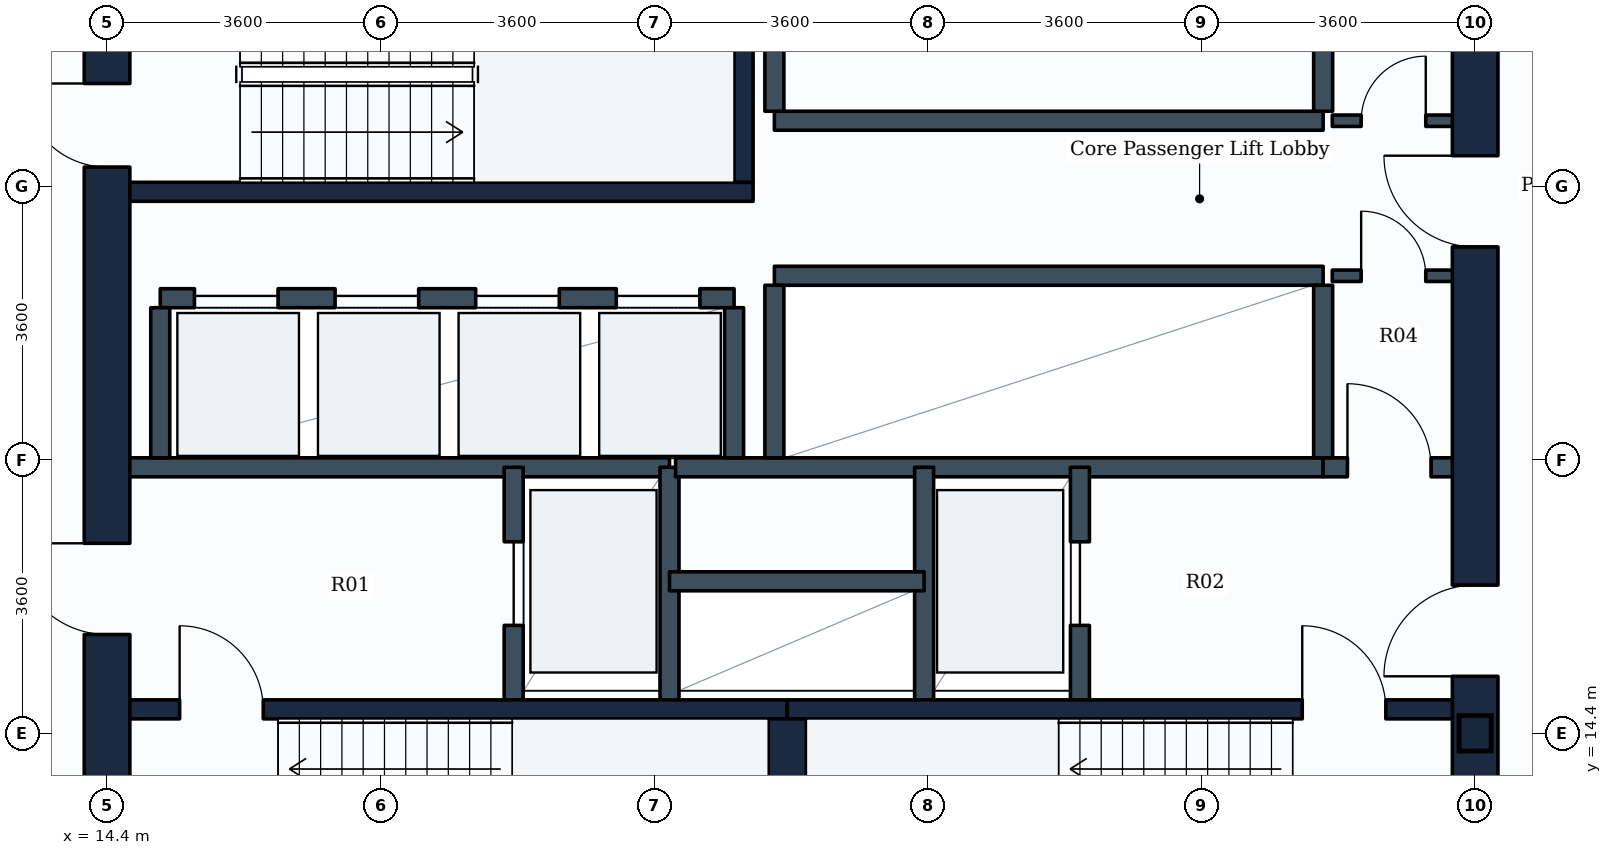
"""IFC4 building model, lengths in metres.
Left out: names, types, materials, properties, quantities, classifications, styles, units other than length and angle.
Written with IfcOpenShell. Run it as: python <this file> out.ifc"""

import sys

from ifc_helpers import new_model, si_unit, direction, frame, frame_2d, origin, origin_2d, place, context, subcontext, project, spatial, rectangle, i_section, extrude, element, fill, save


model = new_model("IFC4")
c1 = context("Model", 3, precision=1e-05, world=origin(), true_north=direction((0.0, 1.0)))
c2 = subcontext(c1, "Body", "Model", "MODEL_VIEW")
j1 = project(units=[si_unit("LENGTHUNIT", "METRE"), si_unit("PLANEANGLEUNIT", "RADIAN")], contexts=[c1])
p1 = place(None, origin())
s1 = spatial("IfcSite", under=j1, at=p1, CompositionType="ELEMENT")
p2 = place(p1, origin())
s2 = spatial("IfcBuilding", under=s1, at=p2, CompositionType="ELEMENT")
p3 = place(p2, frame((0.0, 0.0, 35.7)))
s3 = spatial("IfcBuildingStorey", under=s2, at=p3, CompositionType="ELEMENT", Elevation=35.7)
p4 = place(p3, frame((32.4, 14.4, 0.0), z_axis=(0.0, 0.0, 1.0), x_axis=(1.0, 0.0, 0.0)))
e1 = element("IfcColumn", 1, at=p4, inside=s3, PredefinedType="COLUMN", context=c2, shape_type="SweptSolid", body=[
    extrude(i_section(OverallWidth=0.424, OverallDepth=0.467, WebThickness=0.033, FlangeThickness=0.053, FilletRadius=0.015, at=origin_2d()), origin(), (0.0, 0.0, 1.0), 3.9),
])
p5 = place(p3, frame((14.4, 10.8, 0.0), z_axis=(0.0, 0.0, 1.0), x_axis=(0.0, 1.0, 0.0)))
e2 = element("IfcWall", 2, at=p5, inside=s3, PredefinedType="SHEAR", context=c2, shape_type="SweptSolid", body=[
    extrude(rectangle(XDim=14.4, YDim=0.6, at=frame_2d((7.2, 0.0))), origin(), (0.0, 0.0, 1.0), 3.65),
])
p6 = place(p5, frame((11.05, 0.0, 0.0)))
e3 = element("IfcOpeningElement", 3, at=p6, cuts=e2, PredefinedType="OPENING", context=c2, shape_type="SweptSolid", body=[
    extrude(rectangle(XDim=1.1, YDim=2.1, at=frame_2d((0.55, 1.05))), frame((0.0, 0.31, 0.0), z_axis=(0.0, -1.0, 0.0), x_axis=(1.0, 0.0, 0.0)), (0.0, 0.0, 1.0), 0.62),
])
p7 = place(p5, frame((4.9, 0.0, 0.0)))
e4 = element("IfcOpeningElement", 4, at=p7, cuts=e2, PredefinedType="OPENING", context=c2, shape_type="SweptSolid", body=[
    extrude(rectangle(XDim=1.2, YDim=2.1, at=frame_2d((0.6, 1.05))), frame((0.0, 0.31, 0.0), z_axis=(0.0, -1.0, 0.0), x_axis=(1.0, 0.0, 0.0)), (0.0, 0.0, 1.0), 0.62),
])
p8 = place(p3, frame((32.4, 10.8, 0.0), z_axis=(0.0, 0.0, 1.0), x_axis=(0.0, 1.0, 0.0)))
e5 = element("IfcWall", 5, at=p8, inside=s3, PredefinedType="SHEAR", context=c2, shape_type="SweptSolid", body=[
    extrude(rectangle(XDim=14.4, YDim=0.6, at=frame_2d((7.2, 0.0))), origin(), (0.0, 0.0, 1.0), 3.65),
])
p9 = place(p8, frame((4.35, 0.0, 0.0)))
e6 = element("IfcOpeningElement", 6, at=p9, cuts=e5, PredefinedType="OPENING", context=c2, shape_type="SweptSolid", body=[
    extrude(rectangle(XDim=1.2, YDim=2.1, at=frame_2d((0.6, 1.05))), frame((0.0, 0.31, 0.0), z_axis=(0.0, -1.0, 0.0), x_axis=(1.0, 0.0, 0.0)), (0.0, 0.0, 1.0), 0.62),
])
p10 = place(p8, frame((10.0, 0.0, 0.0)))
e7 = element("IfcOpeningElement", 7, at=p10, cuts=e5, PredefinedType="OPENING", context=c2, shape_type="SweptSolid", body=[
    extrude(rectangle(XDim=1.2, YDim=2.1, at=frame_2d((0.6, 1.05))), frame((0.0, 0.31, 0.0), z_axis=(0.0, -1.0, 0.0), x_axis=(1.0, 0.0, 0.0)), (0.0, 0.0, 1.0), 0.62),
])
p11 = place(p3, frame((14.7, 14.715, 0.0), z_axis=(0.0, 0.0, 1.0), x_axis=(1.0, 0.0, 0.0)))
e8 = element("IfcWall", 8, at=p11, inside=s3, PredefinedType="SHEAR", context=c2, shape_type="SweptSolid", body=[
    extrude(rectangle(XDim=8.65, YDim=0.25, at=frame_2d((4.325, 0.0))), origin(), (0.0, 0.0, 1.0), 3.65),
])
p12 = place(p11, frame((0.655, 0.0, 0.0)))
e9 = element("IfcOpeningElement", 9, at=p12, cuts=e8, PredefinedType="OPENING", context=c2, shape_type="SweptSolid", body=[
    extrude(rectangle(XDim=1.1, YDim=2.1, at=frame_2d((0.55, 1.05))), frame((0.0, 0.135, 0.0), z_axis=(0.0, -1.0, 0.0), x_axis=(1.0, 0.0, 0.0)), (0.0, 0.0, 1.0), 0.27),
])
p13 = place(p3, frame((23.35, 14.715, 0.0), z_axis=(0.0, 0.0, 1.0), x_axis=(1.0, 0.0, 0.0)))
e10 = element("IfcWall", 10, at=p13, inside=s3, PredefinedType="SHEAR", context=c2, shape_type="SweptSolid", body=[
    extrude(rectangle(XDim=8.75, YDim=0.25, at=frame_2d((4.375, 0.0))), origin(), (0.0, 0.0, 1.0), 3.65),
])
p14 = place(p13, frame((6.775, 0.0, 0.0)))
e11 = element("IfcOpeningElement", 11, at=p14, cuts=e10, PredefinedType="OPENING", context=c2, shape_type="SweptSolid", body=[
    extrude(rectangle(XDim=1.1, YDim=2.1, at=frame_2d((0.55, 1.05))), frame((0.0, 0.135, 0.0), z_axis=(0.0, -1.0, 0.0), x_axis=(1.0, 0.0, 0.0)), (0.0, 0.0, 1.0), 0.27),
])
p15 = place(p3, frame((23.35, 11.75, 0.0), z_axis=(0.0, 0.0, 1.0), x_axis=(0.0, 1.0, 0.0)))
e12 = element("IfcWall", 12, at=p15, inside=s3, PredefinedType="SHEAR", context=c2, shape_type="SweptSolid", body=[
    extrude(rectangle(XDim=2.84, YDim=0.5, at=frame_2d((1.42, 0.0))), origin(), (0.0, 0.0, 1.0), 3.65),
])
p16 = place(p3, frame((14.7, 21.525, 0.0), z_axis=(0.0, 0.0, 1.0), x_axis=(1.0, 0.0, 0.0)))
e13 = element("IfcWall", 13, at=p16, inside=s3, PredefinedType="SHEAR", context=c2, shape_type="SweptSolid", body=[
    extrude(rectangle(XDim=8.2, YDim=0.25, at=frame_2d((4.1, 0.0))), origin(), (0.0, 0.0, 1.0), 3.65),
])
p17 = place(p3, frame((22.775, 21.65, 0.0), z_axis=(0.0, 0.0, 1.0), x_axis=(0.0, 1.0, 0.0)))
e14 = element("IfcWall", 14, at=p17, inside=s3, PredefinedType="SHEAR", context=c2, shape_type="SweptSolid", body=[
    extrude(rectangle(XDim=2.84, YDim=0.25, at=frame_2d((1.42, 0.0))), origin(), (0.0, 0.0, 1.0), 3.65),
])
p18 = place(p3, frame((14.65, 17.9, 0.0), z_axis=(0.0, 0.0, 1.0), x_axis=(1.0, 0.0, 0.0)))
e15 = element("IfcWall", 15, at=p18, inside=s3, PredefinedType="PARTITIONING", context=c2, shape_type="SweptSolid", body=[
    extrude(rectangle(XDim=7.15, YDim=0.25, at=frame_2d((3.575, 0.0))), origin(), (0.0, 0.0, 1.0), 3.635),
])
p19 = place(p3, frame((19.75, 14.84, 0.0), z_axis=(0.0, 0.0, 1.0), x_axis=(0.0, 1.0, 0.0)))
e16 = element("IfcWall", 16, at=p19, inside=s3, PredefinedType="PARTITIONING", context=c2, shape_type="SweptSolid", body=[
    extrude(rectangle(XDim=3.06, YDim=0.25, at=frame_2d((1.53, 0.0))), origin(), (0.0, 0.0, 1.0), 3.635),
])
p20 = place(p19, frame((0.98, 0.0, 0.0)))
e17 = element("IfcOpeningElement", 17, at=p20, cuts=e16, PredefinedType="OPENING", context=c2, shape_type="SweptSolid", body=[
    extrude(rectangle(XDim=1.1, YDim=2.1, at=frame_2d((0.55, 1.05))), frame((0.0, 0.135, 0.0), z_axis=(0.0, -1.0, 0.0), x_axis=(1.0, 0.0, 0.0)), (0.0, 0.0, 1.0), 0.27),
])
p21 = place(p3, frame((21.8, 14.84, 0.0), z_axis=(0.0, 0.0, 1.0), x_axis=(0.0, 1.0, 0.0)))
e18 = element("IfcWall", 18, at=p21, inside=s3, PredefinedType="PARTITIONING", context=c2, shape_type="SweptSolid", body=[
    extrude(rectangle(XDim=3.06, YDim=0.25, at=frame_2d((1.53, 0.0))), origin(), (0.0, 0.0, 1.0), 3.635),
])
p22 = place(p3, frame((21.88, 17.9, 0.0), z_axis=(0.0, 0.0, 1.0), x_axis=(1.0, 0.0, 0.0)))
e19 = element("IfcWall", 19, at=p22, inside=s3, PredefinedType="PARTITIONING", context=c2, shape_type="SweptSolid", body=[
    extrude(rectangle(XDim=8.52, YDim=0.25, at=frame_2d((4.26, 0.0))), origin(), (0.0, 0.0, 1.0), 3.635),
])
p23 = place(p3, frame((30.4, 17.9, 0.0), z_axis=(0.0, 0.0, 1.0), x_axis=(1.0, 0.0, 0.0)))
e20 = element("IfcWall", 20, at=p23, inside=s3, PredefinedType="PARTITIONING", context=c2, shape_type="SweptSolid", body=[
    extrude(rectangle(XDim=1.75, YDim=0.25, at=frame_2d((0.875, 0.0))), origin(), (0.0, 0.0, 1.0), 3.635),
])
p24 = place(p23, frame((0.32, 0.0, 0.0)))
e21 = element("IfcOpeningElement", 21, at=p24, cuts=e20, PredefinedType="OPENING", context=c2, shape_type="SweptSolid", body=[
    extrude(rectangle(XDim=1.1, YDim=2.1, at=frame_2d((0.55, 1.05))), frame((0.0, 0.135, 0.0), z_axis=(0.0, -1.0, 0.0), x_axis=(1.0, 0.0, 0.0)), (0.0, 0.0, 1.0), 0.27),
])
p25 = place(p3, frame((25.15, 14.84, 0.0), z_axis=(0.0, 0.0, 1.0), x_axis=(0.0, 1.0, 0.0)))
e22 = element("IfcWall", 22, at=p25, inside=s3, PredefinedType="PARTITIONING", context=c2, shape_type="SweptSolid", body=[
    extrude(rectangle(XDim=3.06, YDim=0.25, at=frame_2d((1.53, 0.0))), origin(), (0.0, 0.0, 1.0), 3.635),
])
p26 = place(p3, frame((27.2, 14.84, 0.0), z_axis=(0.0, 0.0, 1.0), x_axis=(0.0, 1.0, 0.0)))
e23 = element("IfcWall", 23, at=p26, inside=s3, PredefinedType="PARTITIONING", context=c2, shape_type="SweptSolid", body=[
    extrude(rectangle(XDim=3.06, YDim=0.25, at=frame_2d((1.53, 0.0))), origin(), (0.0, 0.0, 1.0), 3.635),
])
p27 = place(p26, frame((0.98, 0.0, 0.0)))
e24 = element("IfcOpeningElement", 24, at=p27, cuts=e23, PredefinedType="OPENING", context=c2, shape_type="SweptSolid", body=[
    extrude(rectangle(XDim=1.1, YDim=2.1, at=frame_2d((0.55, 1.05))), frame((0.0, 0.135, 0.0), z_axis=(0.0, -1.0, 0.0), x_axis=(1.0, 0.0, 0.0)), (0.0, 0.0, 1.0), 0.27),
])
p28 = place(p3, frame((21.8, 16.4, 0.0), z_axis=(0.0, 0.0, 1.0), x_axis=(1.0, 0.0, 0.0)))
e25 = element("IfcWall", 25, at=p28, inside=s3, PredefinedType="PARTITIONING", context=c2, shape_type="SweptSolid", body=[
    extrude(rectangle(XDim=3.35, YDim=0.25, at=frame_2d((1.675, 0.0))), origin(), (0.0, 0.0, 1.0), 3.635),
])
p29 = place(p3, frame((15.1, 20.125, 0.0), z_axis=(0.0, 0.0, 1.0), x_axis=(1.0, 0.0, 0.0)))
e26 = element("IfcWall", 26, at=p29, inside=s3, PredefinedType="PARTITIONING", context=c2, shape_type="SweptSolid", body=[
    extrude(rectangle(XDim=7.55, YDim=0.25, at=frame_2d((3.775, 0.0))), origin(), (0.0, 0.0, 1.0), 3.635),
])
p30 = place(p29, frame((0.45, 0.0, 0.0)))
e27 = element("IfcOpeningElement", 27, at=p30, cuts=e26, PredefinedType="OPENING", context=c2, shape_type="SweptSolid", body=[
    extrude(rectangle(XDim=1.1, YDim=2.1, at=frame_2d((0.55, 1.05))), frame((0.0, 0.135, 0.0), z_axis=(0.0, -1.0, 0.0), x_axis=(1.0, 0.0, 0.0)), (0.0, 0.0, 1.0), 0.27),
])
p31 = place(p29, frame((2.3, 0.0, 0.0)))
e28 = element("IfcOpeningElement", 28, at=p31, cuts=e26, PredefinedType="OPENING", context=c2, shape_type="SweptSolid", body=[
    extrude(rectangle(XDim=1.1, YDim=2.1, at=frame_2d((0.55, 1.05))), frame((0.0, 0.135, 0.0), z_axis=(0.0, -1.0, 0.0), x_axis=(1.0, 0.0, 0.0)), (0.0, 0.0, 1.0), 0.27),
])
p32 = place(p29, frame((4.15, 0.0, 0.0)))
e29 = element("IfcOpeningElement", 29, at=p32, cuts=e26, PredefinedType="OPENING", context=c2, shape_type="SweptSolid", body=[
    extrude(rectangle(XDim=1.1, YDim=2.1, at=frame_2d((0.55, 1.05))), frame((0.0, 0.135, 0.0), z_axis=(0.0, -1.0, 0.0), x_axis=(1.0, 0.0, 0.0)), (0.0, 0.0, 1.0), 0.27),
])
p33 = place(p29, frame((6.0, 0.0, 0.0)))
e30 = element("IfcOpeningElement", 30, at=p33, cuts=e26, PredefinedType="OPENING", context=c2, shape_type="SweptSolid", body=[
    extrude(rectangle(XDim=1.1, YDim=2.1, at=frame_2d((0.55, 1.05))), frame((0.0, 0.135, 0.0), z_axis=(0.0, -1.0, 0.0), x_axis=(1.0, 0.0, 0.0)), (0.0, 0.0, 1.0), 0.27),
])
for number, where, z_axis, x_axis in (
    (31, (15.1, 18.025, 0.0), (0.0, 0.0, 1.0), (0.0, 1.0, 0.0)),
    (32, (22.65, 18.025, 0.0), (0.0, 0.0, 1.0), (0.0, 1.0, 0.0)),
):
    element("IfcWall", number, at=place(p3, frame(where, z_axis=z_axis, x_axis=x_axis)), inside=s3, PredefinedType="PARTITIONING", context=c2, shape_type="SweptSolid", body=[
        extrude(rectangle(XDim=1.975, YDim=0.25, at=frame_2d((0.988, 0.0))), origin(), (0.0, 0.0, 1.0), 3.635),
    ])
p34 = place(p3, frame((23.18, 20.42, 0.0), z_axis=(0.0, 0.0, 1.0), x_axis=(1.0, 0.0, 0.0)))
e33 = element("IfcWall", 33, at=p34, inside=s3, PredefinedType="PARTITIONING", context=c2, shape_type="SweptSolid", body=[
    extrude(rectangle(XDim=7.22, YDim=0.25, at=frame_2d((3.61, 0.0))), origin(), (0.0, 0.0, 1.0), 3.635),
])
for number, where, z_axis, x_axis in (
    (34, (23.18, 18.025, 0.0), (0.0, 0.0, 1.0), (0.0, 1.0, 0.0)),
    (35, (30.4, 18.025, 0.0), (0.0, 0.0, 1.0), (0.0, 1.0, 0.0)),
):
    element("IfcWall", number, at=place(p3, frame(where, z_axis=z_axis, x_axis=x_axis)), inside=s3, PredefinedType="PARTITIONING", context=c2, shape_type="SweptSolid", body=[
        extrude(rectangle(XDim=2.27, YDim=0.25, at=frame_2d((1.135, 0.0))), origin(), (0.0, 0.0, 1.0), 3.635),
    ])
p35 = place(p3, frame((23.18, 22.46, 0.0), z_axis=(0.0, 0.0, 1.0), x_axis=(1.0, 0.0, 0.0)))
e36 = element("IfcWall", 36, at=p35, inside=s3, PredefinedType="PARTITIONING", context=c2, shape_type="SweptSolid", body=[
    extrude(rectangle(XDim=7.22, YDim=0.25, at=frame_2d((3.61, 0.0))), origin(), (0.0, 0.0, 1.0), 3.635),
])
for number, where, z_axis, x_axis in (
    (37, (23.18, 22.585, 0.0), (0.0, 0.0, 1.0), (0.0, 1.0, 0.0)),
    (38, (30.4, 22.585, 0.0), (0.0, 0.0, 1.0), (0.0, 1.0, 0.0)),
):
    element("IfcWall", number, at=place(p3, frame(where, z_axis=z_axis, x_axis=x_axis)), inside=s3, PredefinedType="PARTITIONING", context=c2, shape_type="SweptSolid", body=[
        extrude(rectangle(XDim=2.315, YDim=0.25, at=frame_2d((1.157, 0.0))), origin(), (0.0, 0.0, 1.0), 3.635),
    ])
p36 = place(p3, frame((30.52, 22.46, 0.0), z_axis=(0.0, 0.0, 1.0), x_axis=(1.0, 0.0, 0.0)))
e39 = element("IfcWall", 39, at=p36, inside=s3, PredefinedType="PARTITIONING", context=c2, shape_type="SweptSolid", body=[
    extrude(rectangle(XDim=1.63, YDim=0.15, at=frame_2d((0.815, 0.0))), origin(), (0.0, 0.0, 1.0), 3.635),
])
p37 = place(p36, frame((0.38, 0.0, 0.0)))
e40 = element("IfcOpeningElement", 40, at=p37, cuts=e39, PredefinedType="OPENING", context=c2, shape_type="SweptSolid", body=[
    extrude(rectangle(XDim=0.85, YDim=2.1, at=frame_2d((0.425, 1.05))), frame((0.0, 0.085, 0.0), z_axis=(0.0, -1.0, 0.0), x_axis=(1.0, 0.0, 0.0)), (0.0, 0.0, 1.0), 0.17),
])
p38 = place(p3, frame((30.52, 20.42, 0.0), z_axis=(0.0, 0.0, 1.0), x_axis=(1.0, 0.0, 0.0)))
e41 = element("IfcWall", 41, at=p38, inside=s3, PredefinedType="PARTITIONING", context=c2, shape_type="SweptSolid", body=[
    extrude(rectangle(XDim=1.63, YDim=0.15, at=frame_2d((0.815, 0.0))), origin(), (0.0, 0.0, 1.0), 3.635),
])
p39 = place(p38, frame((0.38, 0.0, 0.0)))
e42 = element("IfcOpeningElement", 42, at=p39, cuts=e41, PredefinedType="OPENING", context=c2, shape_type="SweptSolid", body=[
    extrude(rectangle(XDim=0.85, YDim=2.1, at=frame_2d((0.425, 1.05))), frame((0.0, 0.085, 0.0), z_axis=(0.0, -1.0, 0.0), x_axis=(1.0, 0.0, 0.0)), (0.0, 0.0, 1.0), 0.17),
])
p40 = place(p12, origin())
e43 = element("IfcDoor", 43, at=p40, inside=s3, OperationType="SINGLE_SWING_LEFT", PredefinedType="DOOR", context=c2, shape_type="SweptSolid", body=[
    extrude(rectangle(XDim=1.1, YDim=2.1, at=frame_2d((0.55, 1.05))), frame((0.0, 0.025, 0.0), z_axis=(0.0, -1.0, 0.0), x_axis=(1.0, 0.0, 0.0)), (0.0, 0.0, 1.0), 0.05),
])
fill(e9, e43)
p41 = place(p14, origin())
e44 = element("IfcDoor", 44, at=p41, inside=s3, OperationType="SINGLE_SWING_LEFT", PredefinedType="DOOR", context=c2, shape_type="SweptSolid", body=[
    extrude(rectangle(XDim=1.1, YDim=2.1, at=frame_2d((0.55, 1.05))), frame((0.0, 0.025, 0.0), z_axis=(0.0, -1.0, 0.0), x_axis=(1.0, 0.0, 0.0)), (0.0, 0.0, 1.0), 0.05),
])
fill(e11, e44)
p42 = place(p6, origin())
e45 = element("IfcDoor", 45, at=p42, inside=s3, OperationType="SINGLE_SWING_RIGHT", PredefinedType="DOOR", context=c2, shape_type="SweptSolid", body=[
    extrude(rectangle(XDim=1.1, YDim=2.1, at=frame_2d((0.55, 1.05))), frame((0.0, 0.025, 0.0), z_axis=(0.0, -1.0, 0.0), x_axis=(1.0, 0.0, 0.0)), (0.0, 0.0, 1.0), 0.05),
])
fill(e3, e45)
p43 = place(p20, origin())
e46 = element("IfcDoor", 46, at=p43, inside=s3, OperationType="SLIDING_TO_LEFT", PredefinedType="DOOR", context=c2, shape_type="SweptSolid", body=[
    extrude(rectangle(XDim=1.1, YDim=2.1, at=frame_2d((0.55, 1.05))), frame((0.0, 0.025, 0.0), z_axis=(0.0, -1.0, 0.0), x_axis=(1.0, 0.0, 0.0)), (0.0, 0.0, 1.0), 0.05),
])
fill(e17, e46)
p44 = place(p27, origin())
e47 = element("IfcDoor", 47, at=p44, inside=s3, OperationType="SLIDING_TO_LEFT", PredefinedType="DOOR", context=c2, shape_type="SweptSolid", body=[
    extrude(rectangle(XDim=1.1, YDim=2.1, at=frame_2d((0.55, 1.05))), frame((0.0, 0.025, 0.0), z_axis=(0.0, -1.0, 0.0), x_axis=(1.0, 0.0, 0.0)), (0.0, 0.0, 1.0), 0.05),
])
fill(e24, e47)
p45 = place(p7, origin())
e48 = element("IfcDoor", 48, at=p45, inside=s3, OperationType="SINGLE_SWING_RIGHT", PredefinedType="DOOR", context=c2, shape_type="SweptSolid", body=[
    extrude(rectangle(XDim=1.2, YDim=2.1, at=frame_2d((0.6, 1.05))), frame((0.0, 0.025, 0.0), z_axis=(0.0, -1.0, 0.0), x_axis=(1.0, 0.0, 0.0)), (0.0, 0.0, 1.0), 0.05),
])
fill(e4, e48)
p46 = place(p9, origin())
e49 = element("IfcDoor", 49, at=p46, inside=s3, OperationType="SINGLE_SWING_LEFT", PredefinedType="DOOR", context=c2, shape_type="SweptSolid", body=[
    extrude(rectangle(XDim=1.2, YDim=2.1, at=frame_2d((0.6, 1.05))), frame((0.0, 0.025, 0.0), z_axis=(0.0, -1.0, 0.0), x_axis=(1.0, 0.0, 0.0)), (0.0, 0.0, 1.0), 0.05),
])
fill(e6, e49)
p47 = place(p24, origin())
e50 = element("IfcDoor", 50, at=p47, inside=s3, OperationType="SINGLE_SWING_LEFT", PredefinedType="DOOR", context=c2, shape_type="SweptSolid", body=[
    extrude(rectangle(XDim=1.1, YDim=2.1, at=frame_2d((0.55, 1.05))), frame((0.0, 0.025, 0.0), z_axis=(0.0, -1.0, 0.0), x_axis=(1.0, 0.0, 0.0)), (0.0, 0.0, 1.0), 0.05),
])
fill(e21, e50)
p48 = place(p30, origin())
e51 = element("IfcDoor", 51, at=p48, inside=s3, OperationType="SLIDING_TO_LEFT", PredefinedType="DOOR", context=c2, shape_type="SweptSolid", body=[
    extrude(rectangle(XDim=1.1, YDim=2.1, at=frame_2d((0.55, 1.05))), frame((0.0, 0.025, 0.0), z_axis=(0.0, -1.0, 0.0), x_axis=(1.0, 0.0, 0.0)), (0.0, 0.0, 1.0), 0.05),
])
fill(e27, e51)
p49 = place(p31, origin())
e52 = element("IfcDoor", 52, at=p49, inside=s3, OperationType="SLIDING_TO_LEFT", PredefinedType="DOOR", context=c2, shape_type="SweptSolid", body=[
    extrude(rectangle(XDim=1.1, YDim=2.1, at=frame_2d((0.55, 1.05))), frame((0.0, 0.025, 0.0), z_axis=(0.0, -1.0, 0.0), x_axis=(1.0, 0.0, 0.0)), (0.0, 0.0, 1.0), 0.05),
])
fill(e28, e52)
p50 = place(p32, origin())
e53 = element("IfcDoor", 53, at=p50, inside=s3, OperationType="SLIDING_TO_LEFT", PredefinedType="DOOR", context=c2, shape_type="SweptSolid", body=[
    extrude(rectangle(XDim=1.1, YDim=2.1, at=frame_2d((0.55, 1.05))), frame((0.0, 0.025, 0.0), z_axis=(0.0, -1.0, 0.0), x_axis=(1.0, 0.0, 0.0)), (0.0, 0.0, 1.0), 0.05),
])
fill(e29, e53)
p51 = place(p33, origin())
e54 = element("IfcDoor", 54, at=p51, inside=s3, OperationType="SLIDING_TO_LEFT", PredefinedType="DOOR", context=c2, shape_type="SweptSolid", body=[
    extrude(rectangle(XDim=1.1, YDim=2.1, at=frame_2d((0.55, 1.05))), frame((0.0, 0.025, 0.0), z_axis=(0.0, -1.0, 0.0), x_axis=(1.0, 0.0, 0.0)), (0.0, 0.0, 1.0), 0.05),
])
fill(e30, e54)
p52 = place(p10, origin())
e55 = element("IfcDoor", 55, at=p52, inside=s3, OperationType="SINGLE_SWING_RIGHT", PredefinedType="DOOR", context=c2, shape_type="SweptSolid", body=[
    extrude(rectangle(XDim=1.2, YDim=2.1, at=frame_2d((0.6, 1.05))), frame((0.0, 0.025, 0.0), z_axis=(0.0, -1.0, 0.0), x_axis=(1.0, 0.0, 0.0)), (0.0, 0.0, 1.0), 0.05),
])
fill(e7, e55)
p53 = place(p37, origin())
e56 = element("IfcDoor", 56, at=p53, inside=s3, OperationType="SINGLE_SWING_RIGHT", PredefinedType="DOOR", context=c2, shape_type="SweptSolid", body=[
    extrude(rectangle(XDim=0.85, YDim=2.1, at=frame_2d((0.425, 1.05))), frame((0.0, 0.025, 0.0), z_axis=(0.0, -1.0, 0.0), x_axis=(1.0, 0.0, 0.0)), (0.0, 0.0, 1.0), 0.05),
])
fill(e40, e56)
p54 = place(p39, origin())
e57 = element("IfcDoor", 57, at=p54, inside=s3, OperationType="SINGLE_SWING_LEFT", PredefinedType="DOOR", context=c2, shape_type="SweptSolid", body=[
    extrude(rectangle(XDim=0.85, YDim=2.1, at=frame_2d((0.425, 1.05))), frame((0.0, 0.025, 0.0), z_axis=(0.0, -1.0, 0.0), x_axis=(1.0, 0.0, 0.0)), (0.0, 0.0, 1.0), 0.05),
])
fill(e42, e57)
save(model, sys.argv[1])
